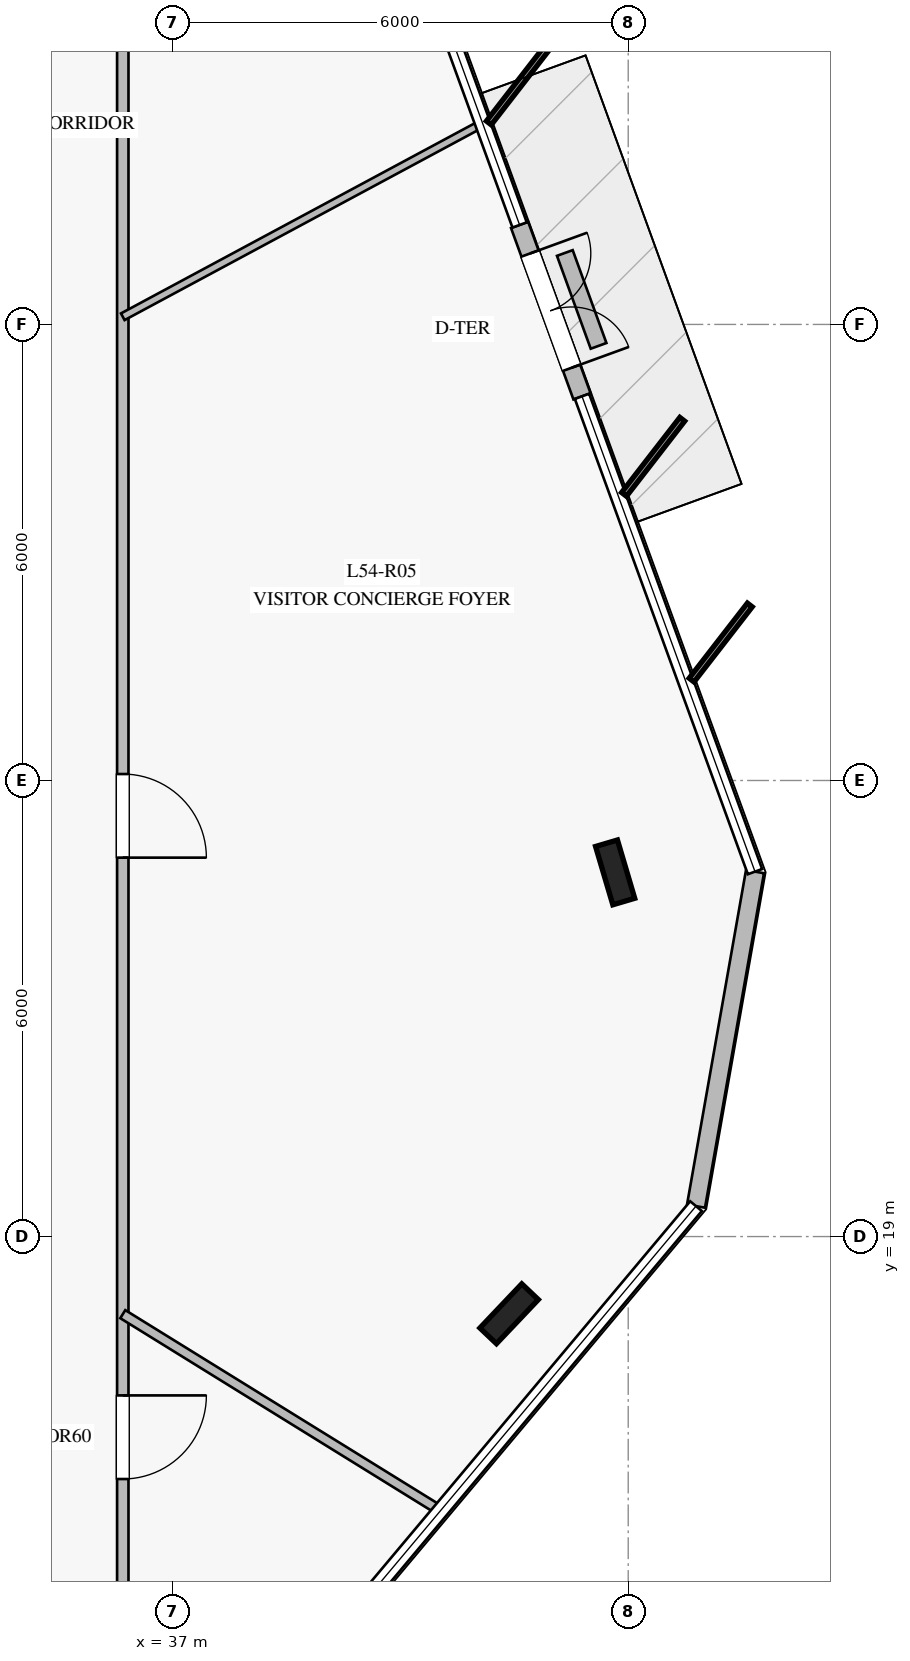
"""IFC4 building model, lengths in metres.
Left out: names, types, materials, properties, quantities, classifications, styles, units other than length and angle.
Written with IfcOpenShell. Run it as: python <this file> out.ifc"""

import sys

from ifc_helpers import new_model, si_unit, direction, frame, frame_2d, origin, origin_2d, place, context, subcontext, project, spatial, rectangle, i_section, extrude, element, fill, save


model = new_model("IFC4")
c1 = context("Model", 3, precision=1e-05, world=origin(), true_north=direction((0.0, 1.0)))
c2 = subcontext(c1, "Body", "Model", "MODEL_VIEW")
j1 = project(units=[si_unit("LENGTHUNIT", "METRE"), si_unit("PLANEANGLEUNIT", "RADIAN")], contexts=[c1])
p1 = place(None, origin())
s1 = spatial("IfcSite", under=j1, at=p1, CompositionType="ELEMENT")
p2 = place(p1, origin())
s2 = spatial("IfcBuilding", under=s1, at=p2, CompositionType="ELEMENT")
p3 = place(p2, frame((0.0, 0.0, 224.8)))
s3 = spatial("IfcBuildingStorey", under=s2, at=p3, CompositionType="ELEMENT", Elevation=224.8)
for number, where, z_axis, x_axis in (
    (1, (41.433, 17.984, 0.0), (0.0, 0.0, 1.0), (0.688, 0.725, 0.0)),
    (2, (42.828, 23.791, 0.0), (0.0, 0.0, 1.0), (-0.284, 0.959, 0.0)),
):
    element("IfcColumn", number, at=place(p3, frame(where, z_axis=z_axis, x_axis=x_axis)), inside=s3, PredefinedType="COLUMN", context=c2, shape_type="SweptSolid", body=[
        extrude(i_section(OverallWidth=0.3, OverallDepth=0.8, WebThickness=0.018, FlangeThickness=0.033, at=origin_2d()), origin(), (0.0, 0.0, 1.0), 4.0),
    ])
p4 = place(p3, frame((43.892, 19.4, 0.0), z_axis=(0.0, 0.0, 1.0), x_axis=(0.173613925281, 0.984813792018, 0.0)))
e3 = element("IfcWall", 3, at=p4, inside=s3, PredefinedType="STANDARD", context=c2, shape_type="SweptSolid", body=[
    extrude(rectangle(XDim=4.469, YDim=0.24, at=frame_2d((2.234, 0.0))), origin(), (0.0, 0.0, 1.0), 3.78),
])
p5 = place(p3, frame((42.392, 30.054, 0.0), z_axis=(0.0, 0.0, 1.0), x_axis=(-0.342110593602, 0.939659694648, 0.0)))
e4 = element("IfcWall", 4, at=p5, inside=s3, PredefinedType="STANDARD", context=c2, shape_type="SweptSolid", body=[
    extrude(rectangle(XDim=2.4, YDim=0.24, at=frame_2d((1.2, 0.0))), origin(), (0.0, 0.0, 1.0), 3.78),
])
p6 = place(p5, frame((0.4, 0.0, 0.0)))
e5 = element("IfcOpeningElement", 5, at=p6, cuts=e4, PredefinedType="OPENING", context=c2, shape_type="SweptSolid", body=[
    extrude(rectangle(XDim=1.6, YDim=2.25, at=frame_2d((0.8, 1.125))), frame((0.0, 0.13, 0.0), z_axis=(0.0, -1.0, 0.0), x_axis=(1.0, 0.0, 0.0)), (0.0, 0.0, 1.0), 0.26),
])
p7 = place(p3, frame((42.61, 30.718, 0.0), z_axis=(0.0, 0.0, 1.0), x_axis=(-0.341577205661, 0.93985371871, 0.0)))
e6 = element("IfcWall", 6, at=p7, inside=s3, PredefinedType="USERDEFINED", context=c2, shape_type="SweptSolid", body=[
    extrude(rectangle(XDim=1.3, YDim=0.22, at=frame_2d((0.65, 0.0))), origin(), (0.0, 0.0, 1.0), 0.4),
])
p8 = place(p3, frame((36.35, 35.75, 0.0), z_axis=(0.0, 0.0, 1.0), x_axis=(0.0, -1.0, 0.0)))
e7 = element("IfcWall", 7, at=p8, inside=s3, PredefinedType="PARTITIONING", context=c2, shape_type="SweptSolid", body=[
    extrude(rectangle(XDim=21.5, YDim=0.15, at=frame_2d((10.75, 0.0))), origin(), (0.0, 0.0, 1.0), 3.28),
])
p9 = place(p8, frame((18.84, 0.0, 0.0)))
e8 = element("IfcOpeningElement", 8, at=p9, cuts=e7, PredefinedType="OPENING", context=c2, shape_type="SweptSolid", body=[
    extrude(rectangle(XDim=1.1, YDim=2.2, at=frame_2d((0.55, 1.1))), frame((0.0, 0.085, 0.0), z_axis=(0.0, -1.0, 0.0), x_axis=(1.0, 0.0, 0.0)), (0.0, 0.0, 1.0), 0.17),
])
p10 = place(p8, frame((10.665, 0.0, 0.0)))
e9 = element("IfcOpeningElement", 9, at=p10, cuts=e7, PredefinedType="OPENING", context=c2, shape_type="SweptSolid", body=[
    extrude(rectangle(XDim=1.1, YDim=2.2, at=frame_2d((0.55, 1.1))), frame((0.0, 0.085, 0.0), z_axis=(0.0, -1.0, 0.0), x_axis=(1.0, 0.0, 0.0)), (0.0, 0.0, 1.0), 0.17),
])
p11 = place(p3, frame((36.35, 17.979, 0.0), z_axis=(0.0, 0.0, 1.0), x_axis=(0.850384110208, -0.526162394234, 0.0)))
e10 = element("IfcWall", 10, at=p11, inside=s3, PredefinedType="PARTITIONING", context=c2, shape_type="SweptSolid", body=[
    extrude(rectangle(XDim=4.897, YDim=0.125, at=frame_2d((2.449, 0.0))), origin(), (0.0, 0.0, 1.0), 3.18),
])
p12 = place(p3, frame((36.35, 31.101, 0.0), z_axis=(0.0, 0.0, 1.0), x_axis=(0.880833659308, 0.473425880819, 0.0)))
e11 = element("IfcWall", 11, at=p12, inside=s3, PredefinedType="MOVABLE", context=c2, shape_type="SweptSolid", body=[
    extrude(rectangle(XDim=5.359, YDim=0.1, at=frame_2d((2.679, 0.0))), origin(), (0.0, 0.0, 1.0), 3.18),
])
p13 = place(p6, frame((1.6, 0.0, 0.0), z_axis=(0.0, 0.0, 1.0), x_axis=(-1.0, 0.0, 0.0)))
e12 = element("IfcDoor", 12, at=p13, inside=s3, OperationType="DOUBLE_DOOR_SINGLE_SWING", PredefinedType="DOOR", context=c2, shape_type="SweptSolid", body=[
    extrude(rectangle(XDim=1.6, YDim=2.25, at=frame_2d((0.8, 1.125))), frame((0.0, 0.025, 0.0), z_axis=(0.0, -1.0, 0.0), x_axis=(1.0, 0.0, 0.0)), (0.0, 0.0, 1.0), 0.05),
])
fill(e5, e12)
p14 = place(p9, origin())
e13 = element("IfcDoor", 13, at=p14, inside=s3, OperationType="SINGLE_SWING_LEFT", PredefinedType="DOOR", context=c2, shape_type="SweptSolid", body=[
    extrude(rectangle(XDim=1.1, YDim=2.2, at=frame_2d((0.55, 1.1))), frame((0.0, 0.025, 0.0), z_axis=(0.0, -1.0, 0.0), x_axis=(1.0, 0.0, 0.0)), (0.0, 0.0, 1.0), 0.05),
])
fill(e8, e13)
p15 = place(p10, origin())
e14 = element("IfcDoor", 14, at=p15, inside=s3, OperationType="SINGLE_SWING_RIGHT", PredefinedType="DOOR", context=c2, shape_type="SweptSolid", body=[
    extrude(rectangle(XDim=1.1, YDim=2.2, at=frame_2d((0.55, 1.1))), frame((0.0, 0.025, 0.0), z_axis=(0.0, -1.0, 0.0), x_axis=(1.0, 0.0, 0.0)), (0.0, 0.0, 1.0), 0.05),
])
fill(e9, e14)
save(model, sys.argv[1])
